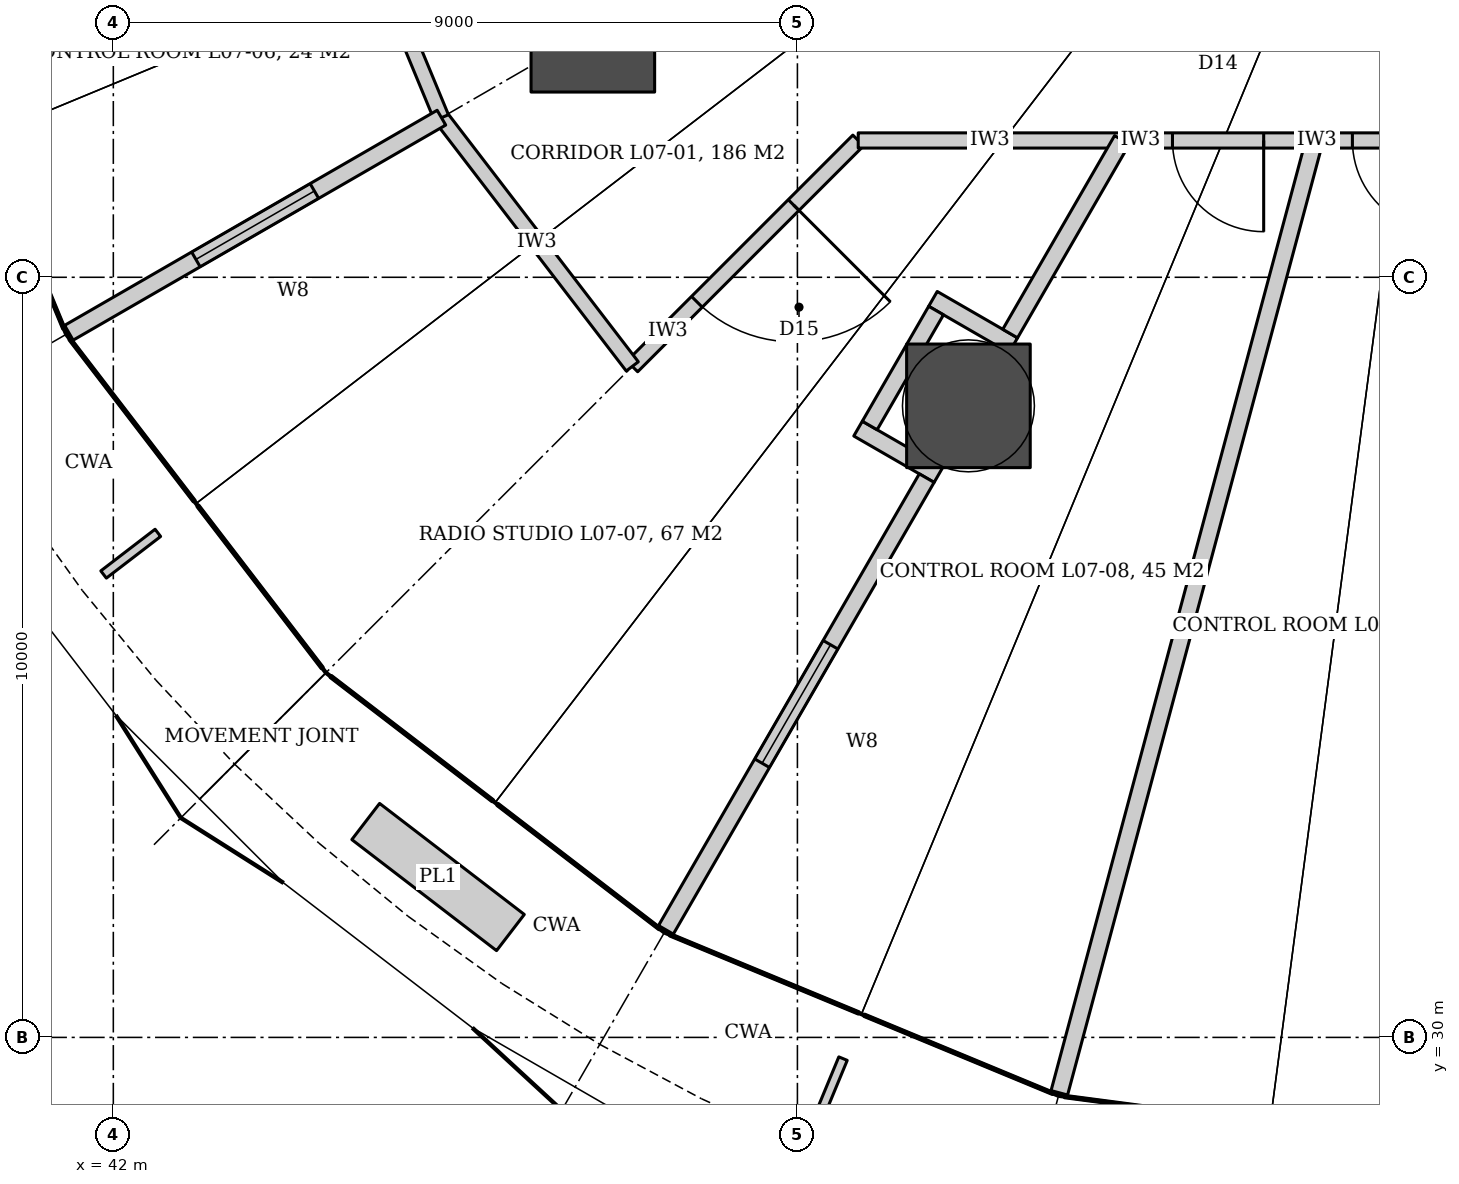
"""IFC4 building model, lengths in metres.
Left out: names, types, materials, properties, quantities, classifications, styles, units other than length and angle.
Written with IfcOpenShell. Run it as: python <this file> out.ifc"""

import sys

from ifc_helpers import new_model, si_unit, direction, frame, frame_2d, origin, origin_2d, place, context, subcontext, project, spatial, rectangle, hollow_circle, extrude, element, fill, save


model = new_model("IFC4")
c1 = context("Model", 3, precision=1e-05, world=origin(), true_north=direction((0.0, 1.0)))
c2 = subcontext(c1, "Body", "Model", "MODEL_VIEW")
j1 = project(units=[si_unit("LENGTHUNIT", "METRE"), si_unit("PLANEANGLEUNIT", "RADIAN")], contexts=[c1])
p1 = place(None, origin())
s1 = spatial("IfcSite", under=j1, at=p1, CompositionType="ELEMENT")
p2 = place(p1, origin())
s2 = spatial("IfcBuilding", under=s1, at=p2, CompositionType="ELEMENT")
p3 = place(p2, frame((0.0, 0.0, 30.2)))
s3 = spatial("IfcBuildingStorey", under=s2, at=p3, CompositionType="ELEMENT", Elevation=30.2)
for number, where, z_axis, x_axis in (
    (1, (48.309, 43.25, 0.0), (0.0, 0.0, 1.0), (1.0, 0.0, 0.0)),
    (2, (53.25, 38.309, 0.0), (0.0, 0.0, 1.0), (1.0, 0.0, 0.0)),
):
    element("IfcColumn", number, at=place(p3, frame(where, z_axis=z_axis, x_axis=x_axis)), inside=s3, PredefinedType="COLUMN", context=c2, shape_type="SweptSolid", body=[
        extrude(hollow_circle(Radius=0.813, WallThickness=0.08, at=origin_2d()), origin(), (0.0, 0.0, 1.0), 4.2),
    ])
p4 = place(p3, frame((51.8, 41.8, 0.0), z_axis=(0.0, 0.0, 1.0), x_axis=(-0.707106781187, -0.707106781187, 0.0)))
e3 = element("IfcWall", 3, at=p4, inside=s3, PredefinedType="PARTITIONING", context=c2, shape_type="SweptSolid", body=[
    extrude(rectangle(XDim=4.204, YDim=0.2, at=frame_2d((2.102, 0.0))), origin(), (0.0, 0.0, 1.0), 3.02),
])
p5 = place(p4, frame((1.202, 0.0, 0.0)))
e4 = element("IfcOpeningElement", 4, at=p5, cuts=e3, PredefinedType="OPENING", context=c2, shape_type="SweptSolid", body=[
    extrude(rectangle(XDim=1.8, YDim=2.7, at=frame_2d((0.9, 1.35))), frame((0.0, 0.11, 0.0), z_axis=(0.0, -1.0, 0.0), x_axis=(1.0, 0.0, 0.0)), (0.0, 0.0, 1.0), 0.22),
])
p6 = place(p3, frame((48.828, 38.828, 0.0), z_axis=(0.0, 0.0, 1.0), x_axis=(-0.608714823874, 0.793389099494, 0.0)))
e5 = element("IfcWall", 5, at=p6, inside=s3, PredefinedType="PARTITIONING", context=c2, shape_type="SweptSolid", body=[
    extrude(rectangle(XDim=4.125, YDim=0.2, at=frame_2d((2.062, 0.0))), origin(), (0.0, 0.0, 1.0), 3.04),
])
p7 = place(p3, frame((46.317, 42.1, 0.0), z_axis=(0.0, 0.0, 1.0), x_axis=(-0.382731667114, 0.923859551549, 0.0)))
e6 = element("IfcWall", 6, at=p7, inside=s3, PredefinedType="PARTITIONING", context=c2, shape_type="SweptSolid", body=[
    extrude(rectangle(XDim=4.125, YDim=0.2, at=frame_2d((2.062, 0.0))), origin(), (0.0, 0.0, 1.0), 3.04),
])
p8 = place(p7, frame((1.462, 0.0, 0.0)))
e7 = element("IfcOpeningElement", 7, at=p8, cuts=e6, PredefinedType="OPENING", context=c2, shape_type="SweptSolid", body=[
    extrude(rectangle(XDim=1.2, YDim=2.4, at=frame_2d((0.6, 1.2))), frame((0.0, 0.11, 0.0), z_axis=(0.0, -1.0, 0.0), x_axis=(1.0, 0.0, 0.0)), (0.0, 0.0, 1.0), 0.22),
])
p9 = place(p3, frame((60.0, 41.8, 0.0), z_axis=(0.0, 0.0, 1.0), x_axis=(-1.0, 0.0, 0.0)))
e8 = element("IfcWall", 8, at=p9, inside=s3, PredefinedType="PARTITIONING", context=c2, shape_type="SweptSolid", body=[
    extrude(rectangle(XDim=2.197, YDim=0.2, at=frame_2d((1.099, 0.0))), origin(), (0.0, 0.0, 1.0), 3.04),
])
p10 = place(p9, frame((0.499, 0.0, 0.0)))
e9 = element("IfcOpeningElement", 9, at=p10, cuts=e8, PredefinedType="OPENING", context=c2, shape_type="SweptSolid", body=[
    extrude(rectangle(XDim=1.2, YDim=2.4, at=frame_2d((0.6, 1.2))), frame((0.0, 0.11, 0.0), z_axis=(0.0, -1.0, 0.0), x_axis=(1.0, 0.0, 0.0)), (0.0, 0.0, 1.0), 0.22),
])
p11 = place(p3, frame((57.803, 41.8, 0.0), z_axis=(0.0, 0.0, 1.0), x_axis=(-1.0, 0.0, 0.0)))
e10 = element("IfcWall", 10, at=p11, inside=s3, PredefinedType="PARTITIONING", context=c2, shape_type="SweptSolid", body=[
    extrude(rectangle(XDim=2.537, YDim=0.2, at=frame_2d((1.269, 0.0))), origin(), (0.0, 0.0, 1.0), 3.04),
])
p12 = place(p11, frame((0.668, 0.0, 0.0)))
e11 = element("IfcOpeningElement", 11, at=p12, cuts=e10, PredefinedType="OPENING", context=c2, shape_type="SweptSolid", body=[
    extrude(rectangle(XDim=1.2, YDim=2.4, at=frame_2d((0.6, 1.2))), frame((0.0, 0.11, 0.0), z_axis=(0.0, -1.0, 0.0), x_axis=(1.0, 0.0, 0.0)), (0.0, 0.0, 1.0), 0.22),
])
p13 = place(p3, frame((55.266, 41.8, 0.0), z_axis=(0.0, 0.0, 1.0), x_axis=(-1.0, 0.0, 0.0)))
e12 = element("IfcWall", 12, at=p13, inside=s3, PredefinedType="PARTITIONING", context=c2, shape_type="SweptSolid", body=[
    extrude(rectangle(XDim=3.466, YDim=0.2, at=frame_2d((1.733, 0.0))), origin(), (0.0, 0.0, 1.0), 3.04),
])
p14 = place(p3, frame((46.317, 42.1, 0.0), z_axis=(0.0, 0.0, 1.0), x_axis=(-0.866022478443, -0.500005066806, 0.0)))
e13 = element("IfcWall", 13, at=p14, inside=s3, PredefinedType="PARTITIONING", context=c2, shape_type="SweptSolid", body=[
    extrude(rectangle(XDim=5.06, YDim=0.225, at=frame_2d((2.53, 0.0))), origin(), (0.0, 0.0, 1.0), 3.04),
])
p15 = place(p14, frame((1.63, 0.0, 0.9)))
e14 = element("IfcOpeningElement", 14, at=p15, cuts=e13, PredefinedType="OPENING", context=c2, shape_type="SweptSolid", body=[
    extrude(rectangle(XDim=1.8, YDim=1.2, at=frame_2d((0.9, 0.6))), frame((0.0, 0.123, 0.0), z_axis=(0.0, -1.0, 0.0), x_axis=(1.0, 0.0, 0.0)), (0.0, 0.0, 1.0), 0.245),
])
p16 = place(p3, frame((53.84, 39.106, 0.0), z_axis=(0.0, 0.0, 1.0), x_axis=(-0.866055662726, 0.499947586314, 0.0)))
e15 = element("IfcWall", 15, at=p16, inside=s3, PredefinedType="PARTITIONING", context=c2, shape_type="SweptSolid", body=[
    extrude(rectangle(XDim=1.22, YDim=0.225, at=frame_2d((0.61, 0.0))), origin(), (0.0, 0.0, 1.0), 3.02),
])
p17 = place(p3, frame((52.855, 37.399, 0.0), z_axis=(0.0, 0.0, 1.0), x_axis=(-0.866019052629, 0.500011000363, 0.0)))
e16 = element("IfcWall", 16, at=p17, inside=s3, PredefinedType="PARTITIONING", context=c2, shape_type="SweptSolid", body=[
    extrude(rectangle(XDim=1.221, YDim=0.225, at=frame_2d((0.61, 0.0))), origin(), (0.0, 0.0, 1.0), 3.02),
])
p18 = place(p3, frame((52.824, 39.562, 0.0), z_axis=(0.0, 0.0, 1.0), x_axis=(-0.499988720078, -0.866031916153, 0.0)))
e17 = element("IfcWall", 17, at=p18, inside=s3, PredefinedType="PARTITIONING", context=c2, shape_type="SweptSolid", body=[
    extrude(rectangle(XDim=1.746, YDim=0.225, at=frame_2d((0.873, 0.0))), origin(), (0.0, 0.0, 1.0), 3.02),
])
p19 = place(p3, frame((55.27, 41.807, 0.0), z_axis=(0.0, 0.0, 1.0), x_axis=(-0.49998584623, -0.866033575313, 0.0)))
e18 = element("IfcWall", 18, at=p19, inside=s3, PredefinedType="PARTITIONING", context=c2, shape_type="SweptSolid", body=[
    extrude(rectangle(XDim=2.942, YDim=0.225, at=frame_2d((1.471, 0.0))), origin(), (0.0, 0.0, 1.0), 3.04),
])
p20 = place(p3, frame((52.701, 37.358, 0.0), z_axis=(0.0, 0.0, 1.0), x_axis=(-0.499980071345, -0.866036909293, 0.0)))
e19 = element("IfcWall", 19, at=p20, inside=s3, PredefinedType="PARTITIONING", context=c2, shape_type="SweptSolid", body=[
    extrude(rectangle(XDim=6.262, YDim=0.225, at=frame_2d((3.131, 0.0))), origin(), (0.0, 0.0, 1.0), 3.04),
])
p21 = place(p20, frame((2.231, 0.0, 0.9)))
e20 = element("IfcOpeningElement", 20, at=p21, cuts=e19, PredefinedType="OPENING", context=c2, shape_type="SweptSolid", body=[
    extrude(rectangle(XDim=1.8, YDim=1.2, at=frame_2d((0.9, 0.6))), frame((0.0, 0.123, 0.0), z_axis=(0.0, -1.0, 0.0), x_axis=(1.0, 0.0, 0.0)), (0.0, 0.0, 1.0), 0.245),
])
p22 = place(p3, frame((57.805, 41.809, 0.0), z_axis=(0.0, 0.0, 1.0), x_axis=(-0.25881625854, -0.965926572942, 0.0)))
e21 = element("IfcWall", 21, at=p22, inside=s3, PredefinedType="PARTITIONING", context=c2, shape_type="SweptSolid", body=[
    extrude(rectangle(XDim=12.38, YDim=0.225, at=frame_2d((6.19, 0.0))), origin(), (0.0, 0.0, 1.0), 3.02),
])
p23 = place(p15, origin())
e22 = element("IfcWindow", 22, at=p23, inside=s3, PartitioningType="SINGLE_PANEL", PredefinedType="WINDOW", context=c2, shape_type="SweptSolid", body=[
    extrude(rectangle(XDim=1.8, YDim=1.2, at=frame_2d((0.9, 0.6))), frame((0.0, 0.03, 0.0), z_axis=(0.0, -1.0, 0.0), x_axis=(1.0, 0.0, 0.0)), (0.0, 0.0, 1.0), 0.06),
])
fill(e14, e22)
p24 = place(p21, origin())
e23 = element("IfcWindow", 23, at=p24, inside=s3, PartitioningType="SINGLE_PANEL", PredefinedType="WINDOW", context=c2, shape_type="SweptSolid", body=[
    extrude(rectangle(XDim=1.8, YDim=1.2, at=frame_2d((0.9, 0.6))), frame((0.0, 0.03, 0.0), z_axis=(0.0, -1.0, 0.0), x_axis=(1.0, 0.0, 0.0)), (0.0, 0.0, 1.0), 0.06),
])
fill(e20, e23)
p25 = place(p5, origin())
e24 = element("IfcDoor", 24, at=p25, inside=s3, OperationType="DOUBLE_DOOR_DOUBLE_SWING", PredefinedType="DOOR", context=c2, shape_type="SweptSolid", body=[
    extrude(rectangle(XDim=1.8, YDim=2.7, at=frame_2d((0.9, 1.35))), frame((0.0, 0.025, 0.0), z_axis=(0.0, -1.0, 0.0), x_axis=(1.0, 0.0, 0.0)), (0.0, 0.0, 1.0), 0.05),
])
fill(e4, e24)
p26 = place(p12, origin())
e25 = element("IfcDoor", 25, at=p26, inside=s3, OperationType="SINGLE_SWING_LEFT", PredefinedType="DOOR", context=c2, shape_type="SweptSolid", body=[
    extrude(rectangle(XDim=1.2, YDim=2.4, at=frame_2d((0.6, 1.2))), frame((0.0, 0.025, 0.0), z_axis=(0.0, -1.0, 0.0), x_axis=(1.0, 0.0, 0.0)), (0.0, 0.0, 1.0), 0.05),
])
fill(e11, e25)
p27 = place(p10, origin())
e26 = element("IfcDoor", 26, at=p27, inside=s3, OperationType="SINGLE_SWING_LEFT", PredefinedType="DOOR", context=c2, shape_type="SweptSolid", body=[
    extrude(rectangle(XDim=1.2, YDim=2.4, at=frame_2d((0.6, 1.2))), frame((0.0, 0.025, 0.0), z_axis=(0.0, -1.0, 0.0), x_axis=(1.0, 0.0, 0.0)), (0.0, 0.0, 1.0), 0.05),
])
fill(e9, e26)
save(model, sys.argv[1])
